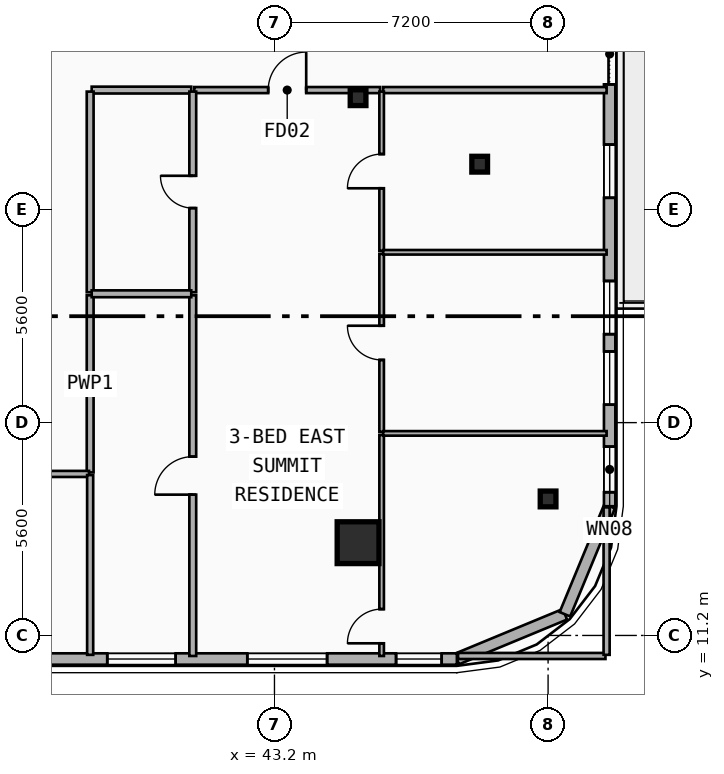
"""IFC4 building model, lengths in metres.
Left out: names, types, materials, properties, quantities, classifications, styles, units other than length and angle.
Written with IfcOpenShell. Run it as: python <this file> out.ifc"""

import sys

from ifc_helpers import new_model, si_unit, direction, frame, frame_2d, origin, origin_2d, place, context, subcontext, project, spatial, rectangle, i_section, extrude, element, fill, save


model = new_model("IFC4")
c1 = context("Model", 3, precision=1e-05, world=origin(), true_north=direction((0.0, 1.0)))
c2 = subcontext(c1, "Body", "Model", "MODEL_VIEW")
j1 = project(units=[si_unit("LENGTHUNIT", "METRE"), si_unit("PLANEANGLEUNIT", "RADIAN")], contexts=[c1])
p1 = place(None, origin())
s1 = spatial("IfcSite", under=j1, at=p1, CompositionType="ELEMENT")
p2 = place(p1, origin())
s2 = spatial("IfcBuilding", under=s1, at=p2, CompositionType="ELEMENT")
p3 = place(p2, frame((0.0, 0.0, 137.7)))
s3 = spatial("IfcBuildingStorey", under=s2, at=p3, CompositionType="ELEMENT", Elevation=137.7)
p4 = place(p3, frame((45.4, 25.35, 0.0), z_axis=(0.0, 0.0, 1.0), x_axis=(1.0, 0.0, 0.0)))
e1 = element("IfcColumn", 1, at=p4, inside=s3, PredefinedType="COLUMN", context=c2, shape_type="SweptSolid", body=[
    extrude(i_section(OverallWidth=0.413, OverallDepth=0.415, WebThickness=0.03, FlangeThickness=0.047, FilletRadius=0.015, at=origin_2d()), origin(), (0.0, 0.0, 1.0), 3.55),
])
p5 = place(p3, frame((45.4, 13.75, 0.0), z_axis=(0.0, -0.090202269788, 0.995923466199), x_axis=(1.0, 0.0, 0.0)))
e2 = element("IfcColumn", 2, at=p5, inside=s3, PredefinedType="COLUMN", context=c2, shape_type="SweptSolid", body=[
    extrude(rectangle(XDim=1.1, YDim=1.1, at=origin_2d()), origin(), (0.0, 0.0, 1.0), 3.565),
])
p6 = place(p3, frame((48.6, 23.6, 0.0), z_axis=(0.0, 0.0, 1.0), x_axis=(1.0, 0.0, 0.0)))
e3 = element("IfcColumn", 3, at=p6, inside=s3, PredefinedType="COLUMN", context=c2, shape_type="SweptSolid", body=[
    extrude(i_section(OverallWidth=0.413, OverallDepth=0.415, WebThickness=0.03, FlangeThickness=0.047, FilletRadius=0.015, at=origin_2d()), origin(), (0.0, 0.0, 1.0), 3.55),
])
p7 = place(p3, frame((50.4, 14.888, 0.0), z_axis=(0.0, -0.079862380324, 0.996805898964), x_axis=(1.0, 0.0, 0.0)))
e4 = element("IfcColumn", 4, at=p7, inside=s3, PredefinedType="COLUMN", context=c2, shape_type="SweptSolid", body=[
    extrude(i_section(OverallWidth=0.413, OverallDepth=0.415, WebThickness=0.03, FlangeThickness=0.047, FilletRadius=0.015, at=origin_2d()), origin(), (0.0, 0.0, 1.0), 3.562),
])
p8 = place(p3, frame((50.843, 11.757, 0.0), z_axis=(0.0, 0.0, 1.0), x_axis=(-0.92389884758, -0.382636798336, 0.0)))
e5 = element("IfcWall", 5, at=p8, inside=s3, PredefinedType="SOLIDWALL", context=c2, shape_type="SweptSolid", body=[
    extrude(rectangle(XDim=3.077, YDim=0.3, at=frame_2d((1.538, 0.0))), origin(), (0.0, 0.0, 1.0), 3.29),
])
p9 = place(p3, frame((52.02, 14.6, 0.0), z_axis=(0.0, 0.0, 1.0), x_axis=(-0.382676475685, -0.923882414032, 0.0)))
e6 = element("IfcWall", 6, at=p9, inside=s3, PredefinedType="SOLIDWALL", context=c2, shape_type="SweptSolid", body=[
    extrude(rectangle(XDim=3.077, YDim=0.3, at=frame_2d((1.539, 0.0))), origin(), (0.0, 0.0, 1.0), 3.29),
])
p10 = place(p3, frame((52.02, 37.6, 0.0), z_axis=(0.0, 0.0, 1.0), x_axis=(0.0, -1.0, 0.0)))
e7 = element("IfcWall", 7, at=p10, inside=s3, PredefinedType="SOLIDWALL", context=c2, shape_type="SweptSolid", body=[
    extrude(rectangle(XDim=23.0, YDim=0.3, at=frame_2d((11.5, 0.0))), origin(), (0.0, 0.0, 1.0), 3.29),
])
p11 = place(p10, frame((10.3, 0.0, 0.0)))
e8 = element("IfcOpeningElement", 8, at=p11, cuts=e7, PredefinedType="OPENING", context=c2, shape_type="SweptSolid", body=[
    extrude(rectangle(XDim=1.6, YDim=2.2, at=frame_2d((0.8, 1.1))), frame((0.0, 0.16, 0.0), z_axis=(0.0, -1.0, 0.0), x_axis=(1.0, 0.0, 0.0)), (0.0, 0.0, 1.0), 0.32),
])
p12 = place(p10, frame((2.513, 0.0, 0.34)))
e9 = element("IfcOpeningElement", 9, at=p12, cuts=e7, PredefinedType="OPENING", context=c2, shape_type="SweptSolid", body=[
    extrude(rectangle(XDim=1.4, YDim=2.1, at=frame_2d((0.7, 1.05))), frame((0.0, 0.16, 0.0), z_axis=(0.0, -1.0, 0.0), x_axis=(1.0, 0.0, 0.0)), (0.0, 0.0, 1.0), 0.32),
])
p13 = place(p10, frame((6.107, 0.0, 0.34)))
e10 = element("IfcOpeningElement", 10, at=p13, cuts=e7, PredefinedType="OPENING", context=c2, shape_type="SweptSolid", body=[
    extrude(rectangle(XDim=1.4, YDim=2.1, at=frame_2d((0.7, 1.05))), frame((0.0, 0.16, 0.0), z_axis=(0.0, -1.0, 0.0), x_axis=(1.0, 0.0, 0.0)), (0.0, 0.0, 1.0), 0.32),
])
p14 = place(p10, frame((21.431, 0.0, 0.68)))
e11 = element("IfcOpeningElement", 11, at=p14, cuts=e7, PredefinedType="OPENING", context=c2, shape_type="SweptSolid", body=[
    extrude(rectangle(XDim=1.2, YDim=1.5, at=frame_2d((0.6, 0.75))), frame((0.0, 0.16, 0.0), z_axis=(0.0, -1.0, 0.0), x_axis=(1.0, 0.0, 0.0)), (0.0, 0.0, 1.0), 0.32),
])
p15 = place(p10, frame((17.073, 0.0, 0.34)))
e12 = element("IfcOpeningElement", 12, at=p15, cuts=e7, PredefinedType="OPENING", context=c2, shape_type="SweptSolid", body=[
    extrude(rectangle(XDim=1.4, YDim=2.1, at=frame_2d((0.7, 1.05))), frame((0.0, 0.16, 0.0), z_axis=(0.0, -1.0, 0.0), x_axis=(1.0, 0.0, 0.0)), (0.0, 0.0, 1.0), 0.32),
])
p16 = place(p10, frame((18.928, 0.0, 0.34)))
e13 = element("IfcOpeningElement", 13, at=p16, cuts=e7, PredefinedType="OPENING", context=c2, shape_type="SweptSolid", body=[
    extrude(rectangle(XDim=1.4, YDim=2.1, at=frame_2d((0.7, 1.05))), frame((0.0, 0.16, 0.0), z_axis=(0.0, -1.0, 0.0), x_axis=(1.0, 0.0, 0.0)), (0.0, 0.0, 1.0), 0.32),
])
p17 = place(p10, frame((13.484, 0.0, 0.34)))
e14 = element("IfcOpeningElement", 14, at=p17, cuts=e7, PredefinedType="OPENING", context=c2, shape_type="SweptSolid", body=[
    extrude(rectangle(XDim=1.4, YDim=2.1, at=frame_2d((0.7, 1.05))), frame((0.0, 0.16, 0.0), z_axis=(0.0, -1.0, 0.0), x_axis=(1.0, 0.0, 0.0)), (0.0, 0.0, 1.0), 0.32),
])
p18 = place(p3, frame((48.0, 10.58, 0.0), z_axis=(0.0, 0.0, 1.0), x_axis=(-1.0, 0.0, 0.0)))
e15 = element("IfcWall", 15, at=p18, inside=s3, PredefinedType="SOLIDWALL", context=c2, shape_type="SweptSolid", body=[
    extrude(rectangle(XDim=38.4, YDim=0.3, at=frame_2d((19.2, 0.0))), origin(), (0.0, 0.0, 1.0), 3.29),
])
p19 = place(p18, frame((36.19, 0.0, 0.8)))
e16 = element("IfcOpeningElement", 16, at=p19, cuts=e15, PredefinedType="OPENING", context=c2, shape_type="SweptSolid", body=[
    extrude(rectangle(XDim=1.8, YDim=1.8, at=frame_2d((0.9, 0.9))), frame((0.0, 0.16, 0.0), z_axis=(0.0, -1.0, 0.0), x_axis=(1.0, 0.0, 0.0)), (0.0, 0.0, 1.0), 0.32),
])
p20 = place(p18, frame((29.45, 0.0, 0.75)))
e17 = element("IfcOpeningElement", 17, at=p20, cuts=e15, PredefinedType="OPENING", context=c2, shape_type="SweptSolid", body=[
    extrude(rectangle(XDim=2.1, YDim=2.1, at=frame_2d((1.05, 1.05))), frame((0.0, 0.16, 0.0), z_axis=(0.0, -1.0, 0.0), x_axis=(1.0, 0.0, 0.0)), (0.0, 0.0, 1.0), 0.32),
])
p21 = place(p18, frame((18.775, 0.0, 0.75)))
e18 = element("IfcOpeningElement", 18, at=p21, cuts=e15, PredefinedType="OPENING", context=c2, shape_type="SweptSolid", body=[
    extrude(rectangle(XDim=2.1, YDim=2.1, at=frame_2d((1.05, 1.05))), frame((0.0, 0.16, 0.0), z_axis=(0.0, -1.0, 0.0), x_axis=(1.0, 0.0, 0.0)), (0.0, 0.0, 1.0), 0.32),
])
p22 = place(p18, frame((22.95, 0.0, 0.8)))
e19 = element("IfcOpeningElement", 19, at=p22, cuts=e15, PredefinedType="OPENING", context=c2, shape_type="SweptSolid", body=[
    extrude(rectangle(XDim=1.8, YDim=1.8, at=frame_2d((0.9, 0.9))), frame((0.0, 0.16, 0.0), z_axis=(0.0, -1.0, 0.0), x_axis=(1.0, 0.0, 0.0)), (0.0, 0.0, 1.0), 0.32),
])
p23 = place(p18, frame((13.35, 0.0, 0.75)))
e20 = element("IfcOpeningElement", 20, at=p23, cuts=e15, PredefinedType="OPENING", context=c2, shape_type="SweptSolid", body=[
    extrude(rectangle(XDim=2.1, YDim=2.1, at=frame_2d((1.05, 1.05))), frame((0.0, 0.16, 0.0), z_axis=(0.0, -1.0, 0.0), x_axis=(1.0, 0.0, 0.0)), (0.0, 0.0, 1.0), 0.32),
])
p24 = place(p18, frame((3.415, 0.0, 0.75)))
e21 = element("IfcOpeningElement", 21, at=p24, cuts=e15, PredefinedType="OPENING", context=c2, shape_type="SweptSolid", body=[
    extrude(rectangle(XDim=2.1, YDim=2.1, at=frame_2d((1.05, 1.05))), frame((0.0, 0.16, 0.0), z_axis=(0.0, -1.0, 0.0), x_axis=(1.0, 0.0, 0.0)), (0.0, 0.0, 1.0), 0.32),
])
p25 = place(p18, frame((7.4, 0.0, 0.8)))
e22 = element("IfcOpeningElement", 22, at=p25, cuts=e15, PredefinedType="OPENING", context=c2, shape_type="SweptSolid", body=[
    extrude(rectangle(XDim=1.8, YDim=1.8, at=frame_2d((0.9, 0.9))), frame((0.0, 0.16, 0.0), z_axis=(0.0, -1.0, 0.0), x_axis=(1.0, 0.0, 0.0)), (0.0, 0.0, 1.0), 0.32),
])
p26 = place(p18, frame((0.4, 0.0, 0.68)))
e23 = element("IfcOpeningElement", 23, at=p26, cuts=e15, PredefinedType="OPENING", context=c2, shape_type="SweptSolid", body=[
    extrude(rectangle(XDim=1.2, YDim=1.5, at=frame_2d((0.6, 0.75))), frame((0.0, 0.16, 0.0), z_axis=(0.0, -1.0, 0.0), x_axis=(1.0, 0.0, 0.0)), (0.0, 0.0, 1.0), 0.32),
])
p27 = place(p3, frame((41.09, 25.55, 0.0), z_axis=(0.0, 0.0, 1.0), x_axis=(1.0, 0.0, 0.0)))
e24 = element("IfcWall", 24, at=p27, inside=s3, PredefinedType="PARTITIONING", context=c2, shape_type="SweptSolid", body=[
    extrude(rectangle(XDim=4.89, YDim=0.16, at=frame_2d((2.445, 0.0))), origin(), (0.0, 0.0, 1.0), 2.456),
])
p28 = place(p27, frame((1.945, 0.0, 0.0)))
e25 = element("IfcOpeningElement", 25, at=p28, cuts=e24, PredefinedType="OPENING", context=c2, shape_type="SweptSolid", body=[
    extrude(rectangle(XDim=1.0, YDim=2.15, at=frame_2d((0.5, 1.075))), frame((0.0, 0.09, 0.0), z_axis=(0.0, -1.0, 0.0), x_axis=(1.0, 0.0, 0.0)), (0.0, 0.0, 1.0), 0.18),
])
p29 = place(p3, frame((38.39, 25.55, 0.0), z_axis=(0.0, 0.0, 1.0), x_axis=(1.0, 0.0, 0.0)))
e26 = element("IfcWall", 26, at=p29, inside=s3, PredefinedType="PLUMBINGWALL", context=c2, shape_type="SweptSolid", body=[
    extrude(rectangle(XDim=2.62, YDim=0.18, at=frame_2d((1.31, 0.0))), origin(), (0.0, 0.0, 1.0), 3.29),
])
p30 = place(p3, frame((46.06, 25.55, 0.0), z_axis=(0.0, 0.0, 1.0), x_axis=(1.0, 0.0, 0.0)))
e27 = element("IfcWall", 27, at=p30, inside=s3, PredefinedType="PARTITIONING", context=c2, shape_type="SweptSolid", body=[
    extrude(rectangle(XDim=5.88, YDim=0.16, at=frame_2d((2.94, 0.0))), origin(), (0.0, 0.0, 1.0), 2.62),
])
p31 = place(p3, frame((38.35, 15.49, 0.0), z_axis=(0.0, 0.0, 1.0), x_axis=(0.0, 1.0, 0.0)))
e28 = element("IfcWall", 28, at=p31, inside=s3, PredefinedType="PLUMBINGWALL", context=c2, shape_type="SweptSolid", body=[
    extrude(rectangle(XDim=4.66, YDim=0.18, at=frame_2d((2.33, 0.0))), origin(), (0.0, 0.0, 1.0), 2.83),
])
p32 = place(p3, frame((38.35, 20.23, 0.0), z_axis=(0.0, 0.0, 1.0), x_axis=(0.0, 1.0, 0.0)))
e29 = element("IfcWall", 29, at=p32, inside=s3, PredefinedType="PLUMBINGWALL", context=c2, shape_type="SweptSolid", body=[
    extrude(rectangle(XDim=5.28, YDim=0.18, at=frame_2d((2.64, 0.0))), origin(), (0.0, 0.0, 1.0), 2.83),
])
p33 = place(p3, frame((41.05, 10.66, 0.0), z_axis=(0.0, 0.0, 1.0), x_axis=(0.0, 1.0, 0.0)))
e30 = element("IfcWall", 30, at=p33, inside=s3, PredefinedType="PLUMBINGWALL", context=c2, shape_type="SweptSolid", body=[
    extrude(rectangle(XDim=9.49, YDim=0.18, at=frame_2d((4.745, 0.0))), origin(), (0.0, 0.0, 1.0), 2.83),
])
p34 = place(p33, frame((4.245, 0.0, 0.0)))
e31 = element("IfcOpeningElement", 31, at=p34, cuts=e30, PredefinedType="OPENING", context=c2, shape_type="SweptSolid", body=[
    extrude(rectangle(XDim=1.0, YDim=2.15, at=frame_2d((0.5, 1.075))), frame((0.0, 0.1, 0.0), z_axis=(0.0, -1.0, 0.0), x_axis=(1.0, 0.0, 0.0)), (0.0, 0.0, 1.0), 0.2),
])
p35 = place(p3, frame((41.05, 20.23, 0.0), z_axis=(0.0, 0.0, 1.0), x_axis=(0.0, 1.0, 0.0)))
e32 = element("IfcWall", 32, at=p35, inside=s3, PredefinedType="PLUMBINGWALL", context=c2, shape_type="SweptSolid", body=[
    extrude(rectangle(XDim=5.28, YDim=0.18, at=frame_2d((2.64, 0.0))), origin(), (0.0, 0.0, 1.0), 2.83),
])
p36 = place(p35, frame((2.215, 0.0, 0.0)))
e33 = element("IfcOpeningElement", 33, at=p36, cuts=e32, PredefinedType="OPENING", context=c2, shape_type="SweptSolid", body=[
    extrude(rectangle(XDim=0.85, YDim=2.1, at=frame_2d((0.425, 1.05))), frame((0.0, 0.1, 0.0), z_axis=(0.0, -1.0, 0.0), x_axis=(1.0, 0.0, 0.0)), (0.0, 0.0, 1.0), 0.2),
])
p37 = place(p3, frame((46.02, 10.66, 0.0), z_axis=(0.0, 0.0, 1.0), x_axis=(0.0, 1.0, 0.0)))
e34 = element("IfcWall", 34, at=p37, inside=s3, PredefinedType="PARTITIONING", context=c2, shape_type="SweptSolid", body=[
    extrude(rectangle(XDim=5.817, YDim=0.12, at=frame_2d((2.909, 0.0))), origin(), (0.0, 0.0, 1.0), 2.97),
])
p38 = place(p37, frame((0.333, 0.0, 0.0)))
e35 = element("IfcOpeningElement", 35, at=p38, cuts=e34, PredefinedType="OPENING", context=c2, shape_type="SweptSolid", body=[
    extrude(rectangle(XDim=0.9, YDim=2.1, at=frame_2d((0.45, 1.05))), frame((0.0, 0.07, 0.0), z_axis=(0.0, -1.0, 0.0), x_axis=(1.0, 0.0, 0.0)), (0.0, 0.0, 1.0), 0.14),
])
p39 = place(p3, frame((46.02, 16.557, 0.0), z_axis=(0.0, 0.0, 1.0), x_axis=(0.0, 1.0, 0.0)))
e36 = element("IfcWall", 36, at=p39, inside=s3, PredefinedType="PARTITIONING", context=c2, shape_type="SweptSolid", body=[
    extrude(rectangle(XDim=4.685, YDim=0.12, at=frame_2d((2.343, 0.0))), origin(), (0.0, 0.0, 1.0), 2.97),
])
p40 = place(p39, frame((1.893, 0.0, 0.0)))
e37 = element("IfcOpeningElement", 37, at=p40, cuts=e36, PredefinedType="OPENING", context=c2, shape_type="SweptSolid", body=[
    extrude(rectangle(XDim=0.9, YDim=2.1, at=frame_2d((0.45, 1.05))), frame((0.0, 0.07, 0.0), z_axis=(0.0, -1.0, 0.0), x_axis=(1.0, 0.0, 0.0)), (0.0, 0.0, 1.0), 0.14),
])
p41 = place(p3, frame((46.02, 21.322, 0.0), z_axis=(0.0, 0.0, 1.0), x_axis=(0.0, 1.0, 0.0)))
e38 = element("IfcWall", 38, at=p41, inside=s3, PredefinedType="PARTITIONING", context=c2, shape_type="SweptSolid", body=[
    extrude(rectangle(XDim=4.188, YDim=0.12, at=frame_2d((2.094, 0.0))), origin(), (0.0, 0.0, 1.0), 2.77),
])
p42 = place(p41, frame((1.644, 0.0, 0.0)))
e39 = element("IfcOpeningElement", 39, at=p42, cuts=e38, PredefinedType="OPENING", context=c2, shape_type="SweptSolid", body=[
    extrude(rectangle(XDim=0.9, YDim=2.1, at=frame_2d((0.45, 1.05))), frame((0.0, 0.07, 0.0), z_axis=(0.0, -1.0, 0.0), x_axis=(1.0, 0.0, 0.0)), (0.0, 0.0, 1.0), 0.14),
])
p43 = place(p3, frame((38.39, 20.19, 0.0), z_axis=(0.0, 0.0, 1.0), x_axis=(1.0, 0.0, 0.0)))
e40 = element("IfcWall", 40, at=p43, inside=s3, PredefinedType="PLUMBINGWALL", context=c2, shape_type="SweptSolid", body=[
    extrude(rectangle(XDim=2.62, YDim=0.18, at=frame_2d((1.31, 0.0))), origin(), (0.0, 0.0, 1.0), 2.96),
])
for number, where, z_axis, x_axis in (
    (41, (46.06, 16.517, 0.0), (0.0, 0.0, 1.0), (1.0, 0.0, 0.0)),
    (42, (46.06, 21.282, 0.0), (0.0, 0.0, 1.0), (1.0, 0.0, 0.0)),
):
    element("IfcWall", number, at=place(p3, frame(where, z_axis=z_axis, x_axis=x_axis)), inside=s3, PredefinedType="PARTITIONING", context=c2, shape_type="SweptSolid", body=[
        extrude(rectangle(XDim=5.88, YDim=0.12, at=frame_2d((2.94, 0.0))), origin(), (0.0, 0.0, 1.0), 2.62),
    ])
p44 = place(p3, frame((36.38, 15.45, 0.0), z_axis=(0.0, 0.0, 1.0), x_axis=(1.0, 0.0, 0.0)))
e43 = element("IfcWall", 43, at=p44, inside=s3, PredefinedType="PARTITIONING", context=c2, shape_type="SweptSolid", body=[
    extrude(rectangle(XDim=1.94, YDim=0.16, at=frame_2d((0.97, 0.0))), origin(), (0.0, 0.0, 1.0), 2.456),
])
p45 = place(p3, frame((38.35, 10.69, 0.0), z_axis=(0.0, 0.0, 1.0), x_axis=(0.0, 1.0, 0.0)))
e44 = element("IfcWall", 44, at=p45, inside=s3, PredefinedType="PARTITIONING", context=c2, shape_type="SweptSolid", body=[
    extrude(rectangle(XDim=4.73, YDim=0.16, at=frame_2d((2.365, 0.0))), origin(), (0.0, 0.0, 1.0), 2.91),
])
p46 = place(p3, frame((48.03, 10.66, 0.0), z_axis=(0.0, 0.0, 1.0), x_axis=(1.0, 0.0, 0.0)))
e45 = element("IfcWall", 45, at=p46, inside=s3, PredefinedType="PARTITIONING", context=c2, shape_type="SweptSolid", body=[
    extrude(rectangle(XDim=3.88, YDim=0.16, at=frame_2d((1.94, 0.0))), origin(), (0.0, 0.0, 1.0), 3.29),
])
p47 = place(p3, frame((51.94, 10.69, 0.0), z_axis=(0.0, 0.0, 1.0), x_axis=(0.0, 1.0, 0.0)))
e46 = element("IfcWall", 46, at=p47, inside=s3, PredefinedType="PARTITIONING", context=c2, shape_type="SweptSolid", body=[
    extrude(rectangle(XDim=3.88, YDim=0.16, at=frame_2d((1.94, 0.0))), origin(), (0.0, 0.0, 1.0), 3.29),
])
p48 = place(p11, origin())
e47 = element("IfcDoor", 47, at=p48, inside=s3, OperationType="DOUBLE_DOOR_SLIDING", PredefinedType="DOOR", context=c2, shape_type="SweptSolid", body=[
    extrude(rectangle(XDim=1.6, YDim=2.2, at=frame_2d((0.8, 1.1))), frame((0.0, 0.025, 0.0), z_axis=(0.0, -1.0, 0.0), x_axis=(1.0, 0.0, 0.0)), (0.0, 0.0, 1.0), 0.05),
])
fill(e8, e47)
p49 = place(p14, origin())
e48 = element("IfcWindow", 48, at=p49, inside=s3, PartitioningType="SINGLE_PANEL", PredefinedType="WINDOW", context=c2, shape_type="SweptSolid", body=[
    extrude(rectangle(XDim=1.2, YDim=1.5, at=frame_2d((0.6, 0.75))), frame((0.0, 0.03, 0.0), z_axis=(0.0, -1.0, 0.0), x_axis=(1.0, 0.0, 0.0)), (0.0, 0.0, 1.0), 0.06),
])
fill(e11, e48)
p50 = place(p15, origin())
e49 = element("IfcWindow", 49, at=p50, inside=s3, PartitioningType="SINGLE_PANEL", PredefinedType="WINDOW", context=c2, shape_type="SweptSolid", body=[
    extrude(rectangle(XDim=1.4, YDim=2.1, at=frame_2d((0.7, 1.05))), frame((0.0, 0.03, 0.0), z_axis=(0.0, -1.0, 0.0), x_axis=(1.0, 0.0, 0.0)), (0.0, 0.0, 1.0), 0.06),
])
fill(e12, e49)
p51 = place(p16, origin())
e50 = element("IfcWindow", 50, at=p51, inside=s3, PartitioningType="SINGLE_PANEL", PredefinedType="WINDOW", context=c2, shape_type="SweptSolid", body=[
    extrude(rectangle(XDim=1.4, YDim=2.1, at=frame_2d((0.7, 1.05))), frame((0.0, 0.03, 0.0), z_axis=(0.0, -1.0, 0.0), x_axis=(1.0, 0.0, 0.0)), (0.0, 0.0, 1.0), 0.06),
])
fill(e13, e50)
p52 = place(p17, origin())
e51 = element("IfcWindow", 51, at=p52, inside=s3, PartitioningType="SINGLE_PANEL", PredefinedType="WINDOW", context=c2, shape_type="SweptSolid", body=[
    extrude(rectangle(XDim=1.4, YDim=2.1, at=frame_2d((0.7, 1.05))), frame((0.0, 0.03, 0.0), z_axis=(0.0, -1.0, 0.0), x_axis=(1.0, 0.0, 0.0)), (0.0, 0.0, 1.0), 0.06),
])
fill(e14, e51)
p53 = place(p24, origin())
e52 = element("IfcWindow", 52, at=p53, inside=s3, PartitioningType="SINGLE_PANEL", PredefinedType="WINDOW", context=c2, shape_type="SweptSolid", body=[
    extrude(rectangle(XDim=2.1, YDim=2.1, at=frame_2d((1.05, 1.05))), frame((0.0, 0.03, 0.0), z_axis=(0.0, -1.0, 0.0), x_axis=(1.0, 0.0, 0.0)), (0.0, 0.0, 1.0), 0.06),
])
fill(e21, e52)
p54 = place(p25, origin())
e53 = element("IfcWindow", 53, at=p54, inside=s3, PartitioningType="SINGLE_PANEL", PredefinedType="WINDOW", context=c2, shape_type="SweptSolid", body=[
    extrude(rectangle(XDim=1.8, YDim=1.8, at=frame_2d((0.9, 0.9))), frame((0.0, 0.03, 0.0), z_axis=(0.0, -1.0, 0.0), x_axis=(1.0, 0.0, 0.0)), (0.0, 0.0, 1.0), 0.06),
])
fill(e22, e53)
p55 = place(p26, origin())
e54 = element("IfcWindow", 54, at=p55, inside=s3, PartitioningType="SINGLE_PANEL", PredefinedType="WINDOW", context=c2, shape_type="SweptSolid", body=[
    extrude(rectangle(XDim=1.2, YDim=1.5, at=frame_2d((0.6, 0.75))), frame((0.0, 0.03, 0.0), z_axis=(0.0, -1.0, 0.0), x_axis=(1.0, 0.0, 0.0)), (0.0, 0.0, 1.0), 0.06),
])
fill(e23, e54)
p56 = place(p28, origin())
e55 = element("IfcDoor", 55, at=p56, inside=s3, OperationType="SINGLE_SWING_RIGHT", PredefinedType="DOOR", context=c2, shape_type="SweptSolid", body=[
    extrude(rectangle(XDim=1.0, YDim=2.15, at=frame_2d((0.5, 1.075))), frame((0.0, 0.025, 0.0), z_axis=(0.0, -1.0, 0.0), x_axis=(1.0, 0.0, 0.0)), (0.0, 0.0, 1.0), 0.05),
])
fill(e25, e55)
p57 = place(p34, origin())
e56 = element("IfcDoor", 56, at=p57, inside=s3, OperationType="SINGLE_SWING_LEFT", PredefinedType="DOOR", context=c2, shape_type="SweptSolid", body=[
    extrude(rectangle(XDim=1.0, YDim=2.15, at=frame_2d((0.5, 1.075))), frame((0.0, 0.025, 0.0), z_axis=(0.0, -1.0, 0.0), x_axis=(1.0, 0.0, 0.0)), (0.0, 0.0, 1.0), 0.05),
])
fill(e31, e56)
p58 = place(p36, origin())
e57 = element("IfcDoor", 57, at=p58, inside=s3, OperationType="SINGLE_SWING_RIGHT", PredefinedType="DOOR", context=c2, shape_type="SweptSolid", body=[
    extrude(rectangle(XDim=0.85, YDim=2.1, at=frame_2d((0.425, 1.05))), frame((0.0, 0.025, 0.0), z_axis=(0.0, -1.0, 0.0), x_axis=(1.0, 0.0, 0.0)), (0.0, 0.0, 1.0), 0.05),
])
fill(e33, e57)
p59 = place(p38, origin())
e58 = element("IfcDoor", 58, at=p59, inside=s3, OperationType="SINGLE_SWING_LEFT", PredefinedType="DOOR", context=c2, shape_type="SweptSolid", body=[
    extrude(rectangle(XDim=0.9, YDim=2.1, at=frame_2d((0.45, 1.05))), frame((0.0, 0.025, 0.0), z_axis=(0.0, -1.0, 0.0), x_axis=(1.0, 0.0, 0.0)), (0.0, 0.0, 1.0), 0.05),
])
fill(e35, e58)
p60 = place(p40, origin())
e59 = element("IfcDoor", 59, at=p60, inside=s3, OperationType="SINGLE_SWING_RIGHT", PredefinedType="DOOR", context=c2, shape_type="SweptSolid", body=[
    extrude(rectangle(XDim=0.9, YDim=2.1, at=frame_2d((0.45, 1.05))), frame((0.0, 0.025, 0.0), z_axis=(0.0, -1.0, 0.0), x_axis=(1.0, 0.0, 0.0)), (0.0, 0.0, 1.0), 0.05),
])
fill(e37, e59)
p61 = place(p42, origin())
e60 = element("IfcDoor", 60, at=p61, inside=s3, OperationType="SINGLE_SWING_LEFT", PredefinedType="DOOR", context=c2, shape_type="SweptSolid", body=[
    extrude(rectangle(XDim=0.9, YDim=2.1, at=frame_2d((0.45, 1.05))), frame((0.0, 0.025, 0.0), z_axis=(0.0, -1.0, 0.0), x_axis=(1.0, 0.0, 0.0)), (0.0, 0.0, 1.0), 0.05),
])
fill(e39, e60)
save(model, sys.argv[1])
